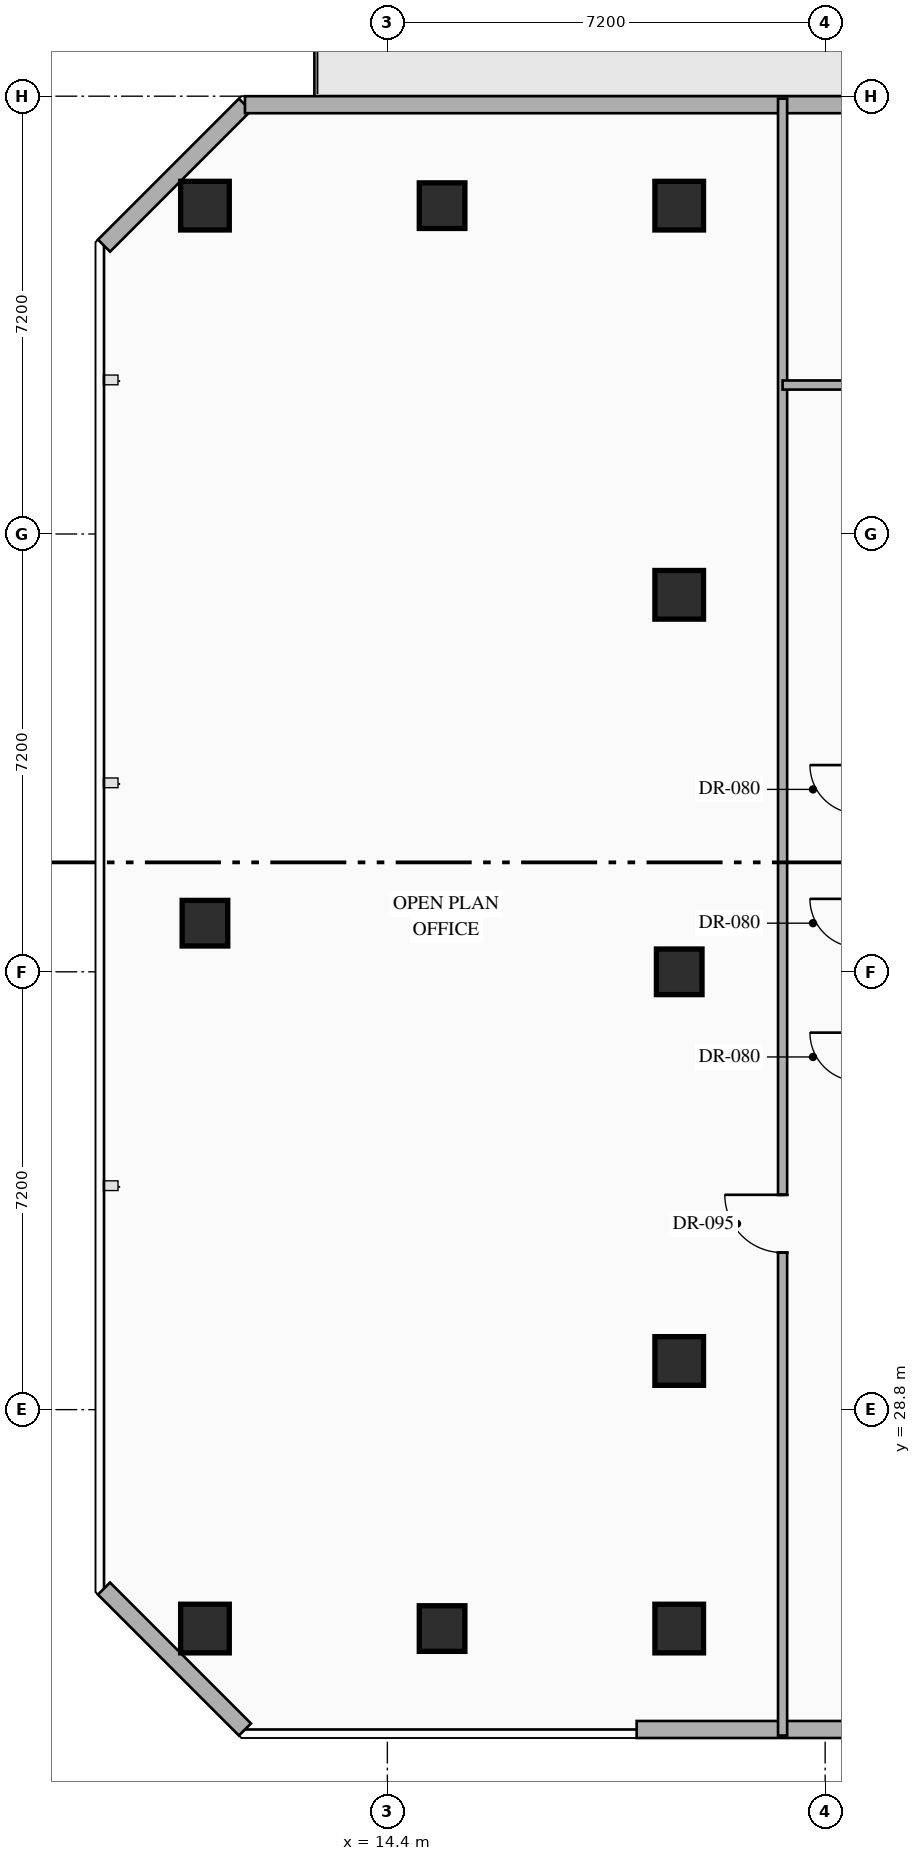
"""IFC4 building model, lengths in metres.
Left out: names, types, materials, properties, quantities, classifications, styles, units other than length and angle.
Written with IfcOpenShell. Run it as: python <this file> out.ifc"""

import sys

from ifc_helpers import new_model, si_unit, direction, frame, frame_2d, origin, origin_2d, place, context, subcontext, project, spatial, rectangle, hollow_rectangle, extrude, element, fill, save


model = new_model("IFC4")
c1 = context("Model", 3, precision=1e-05, world=origin(), true_north=direction((0.0, 1.0)))
c2 = subcontext(c1, "Body", "Model", "MODEL_VIEW")
j1 = project(units=[si_unit("LENGTHUNIT", "METRE"), si_unit("PLANEANGLEUNIT", "RADIAN")], contexts=[c1])
p1 = place(None, origin())
s1 = spatial("IfcSite", under=j1, at=p1, CompositionType="ELEMENT")
p2 = place(p1, origin())
s2 = spatial("IfcBuilding", under=s1, at=p2, CompositionType="ELEMENT")
p3 = place(p2, frame((0.0, 0.0, 170.85)))
s3 = spatial("IfcBuildingStorey", under=s2, at=p3, CompositionType="ELEMENT", Elevation=170.85)
for number, where, z_axis, x_axis in (
    (1, (11.4, 25.2, 0.0), (0.0, 0.0, 1.0), (1.0, 0.0, 0.0)),
    (2, (11.4, 48.6, 0.0), (0.0, 0.0, 1.0), (1.0, 0.0, 0.0)),
    (3, (19.2, 48.6, 0.0), (0.0, 0.0, 1.0), (1.0, 0.0, 0.0)),
    (4, (19.2, 25.2, 0.0), (0.0, 0.0, 1.0), (1.0, 0.0, 0.0)),
    (5, (19.2, 29.6, 0.0), (0.0, 0.0, 1.0), (1.0, 0.0, 0.0)),
    (6, (19.2, 42.2, 0.0), (0.0, 0.0, 1.0), (1.0, 0.0, 0.0)),
):
    element("IfcColumn", number, at=place(p3, frame(where, z_axis=z_axis, x_axis=x_axis)), inside=s3, PredefinedType="COLUMN", context=c2, shape_type="SweptSolid", body=[
        extrude(hollow_rectangle(XDim=0.8, YDim=0.8, WallThickness=0.032, at=origin_2d()), origin(), (0.0, 0.0, 1.0), 3.6),
    ])
for number, where, z_axis, x_axis in (
    (7, (11.4, 36.8, 0.0), (0.0, 0.0, 1.0), (1.0, 0.0, 0.0)),
    (8, (19.2, 36.0, 0.0), (0.0, 0.0, 1.0), (1.0, 0.0, 0.0)),
    (9, (15.3, 25.2, 0.0), (0.0, 0.0, 1.0), (1.0, 0.0, 0.0)),
    (10, (15.3, 48.6, 0.0), (0.0, 0.0, 1.0), (1.0, 0.0, 0.0)),
):
    element("IfcColumn", number, at=place(p3, frame(where, z_axis=z_axis, x_axis=x_axis)), inside=s3, PredefinedType="COLUMN", context=c2, shape_type="SweptSolid", body=[
        extrude(hollow_rectangle(XDim=0.75, YDim=0.75, WallThickness=0.028, at=origin_2d()), origin(), (0.0, 0.0, 1.0), 3.6),
    ])
p4 = place(p3, frame((25.247, 23.54, 0.0), z_axis=(0.0, 0.0, 1.0), x_axis=(-1.0, 0.0, 0.0)))
e11 = element("IfcWall", 11, at=p4, inside=s3, PredefinedType="STANDARD", context=c2, shape_type="SweptSolid", body=[
    extrude(rectangle(XDim=6.747, YDim=0.28, at=frame_2d((3.374, 0.0))), origin(), (0.0, 0.0, 1.0), 3.35),
])
p5 = place(p3, frame((12.058, 23.54, 0.0), z_axis=(0.0, 0.0, 1.0), x_axis=(-0.707144017911, 0.707069542501, 0.0)))
e12 = element("IfcWall", 12, at=p5, inside=s3, PredefinedType="STANDARD", context=c2, shape_type="SweptSolid", body=[
    extrude(rectangle(XDim=3.278, YDim=0.28, at=frame_2d((1.639, 0.0))), origin(), (0.0, 0.0, 1.0), 3.35),
])
p6 = place(p3, frame((9.74, 47.942, 0.0), z_axis=(0.0, 0.0, 1.0), x_axis=(0.707106781187, 0.707106781187, 0.0)))
e13 = element("IfcWall", 13, at=p6, inside=s3, PredefinedType="STANDARD", context=c2, shape_type="SweptSolid", body=[
    extrude(rectangle(XDim=3.278, YDim=0.28, at=frame_2d((1.639, 0.0))), origin(), (0.0, 0.0, 1.0), 3.35),
])
p7 = place(p3, frame((12.058, 50.26, 0.0), z_axis=(0.0, 0.0, 1.0), x_axis=(1.0, 0.0, 0.0)))
e14 = element("IfcWall", 14, at=p7, inside=s3, PredefinedType="STANDARD", context=c2, shape_type="SweptSolid", body=[
    extrude(rectangle(XDim=30.484, YDim=0.28, at=frame_2d((15.242, 0.0))), origin(), (0.0, 0.0, 1.0), 3.35),
])
p8 = place(p7, frame((14.992, 0.0, 0.0)))
e15 = element("IfcOpeningElement", 15, at=p8, cuts=e14, PredefinedType="OPENING", context=c2, shape_type="SweptSolid", body=[
    extrude(rectangle(XDim=1.1, YDim=2.2, at=frame_2d((0.55, 1.1))), frame((0.0, 0.15, 0.0), z_axis=(0.0, -1.0, 0.0), x_axis=(1.0, 0.0, 0.0)), (0.0, 0.0, 1.0), 0.3),
])
p9 = place(p7, frame((10.074, 0.0, 0.85)))
e16 = element("IfcOpeningElement", 16, at=p9, cuts=e14, PredefinedType="OPENING", context=c2, shape_type="SweptSolid", body=[
    extrude(rectangle(XDim=1.8, YDim=2.1, at=frame_2d((0.9, 1.05))), frame((0.0, 0.15, 0.0), z_axis=(0.0, -1.0, 0.0), x_axis=(1.0, 0.0, 0.0)), (0.0, 0.0, 1.0), 0.3),
])
p10 = place(p3, frame((20.9, 23.44, 0.0), z_axis=(0.0, 0.0, 1.0), x_axis=(0.0, 1.0, 0.0)))
e17 = element("IfcWall", 17, at=p10, inside=s3, PredefinedType="PARTITIONING", context=c2, shape_type="SweptSolid", body=[
    extrude(rectangle(XDim=26.92, YDim=0.15, at=frame_2d((13.46, 0.0))), origin(), (0.0, 0.0, 1.0), 3.35),
])
p11 = place(p10, frame((7.943, 0.0, 0.0)))
e18 = element("IfcOpeningElement", 18, at=p11, cuts=e17, PredefinedType="OPENING", context=c2, shape_type="SweptSolid", body=[
    extrude(rectangle(XDim=0.95, YDim=2.15, at=frame_2d((0.475, 1.075))), frame((0.0, 0.085, 0.0), z_axis=(0.0, -1.0, 0.0), x_axis=(1.0, 0.0, 0.0)), (0.0, 0.0, 1.0), 0.17),
])
p12 = place(p3, frame((20.9, 45.65, 0.0), z_axis=(0.0, 0.0, 1.0), x_axis=(1.0, 0.0, 0.0)))
e19 = element("IfcWall", 19, at=p12, inside=s3, PredefinedType="PARTITIONING", context=c2, shape_type="SweptSolid", body=[
    extrude(rectangle(XDim=24.06, YDim=0.15, at=frame_2d((12.03, 0.0))), origin(), (0.0, 0.0, 1.0), 2.695),
])
p13 = place(p12, frame((9.32, 0.0, 0.0)))
e20 = element("IfcOpeningElement", 20, at=p13, cuts=e19, PredefinedType="OPENING", context=c2, shape_type="SweptSolid", body=[
    extrude(rectangle(XDim=0.95, YDim=2.15, at=frame_2d((0.475, 1.075))), frame((0.0, 0.085, 0.0), z_axis=(0.0, -1.0, 0.0), x_axis=(1.0, 0.0, 0.0)), (0.0, 0.0, 1.0), 0.17),
])
p14 = place(p11, origin())
e21 = element("IfcDoor", 21, at=p14, inside=s3, OperationType="SINGLE_SWING_RIGHT", PredefinedType="DOOR", context=c2, shape_type="SweptSolid", body=[
    extrude(rectangle(XDim=0.95, YDim=2.15, at=frame_2d((0.475, 1.075))), frame((0.0, 0.025, 0.0), z_axis=(0.0, -1.0, 0.0), x_axis=(1.0, 0.0, 0.0)), (0.0, 0.0, 1.0), 0.05),
])
fill(e18, e21)
save(model, sys.argv[1])
